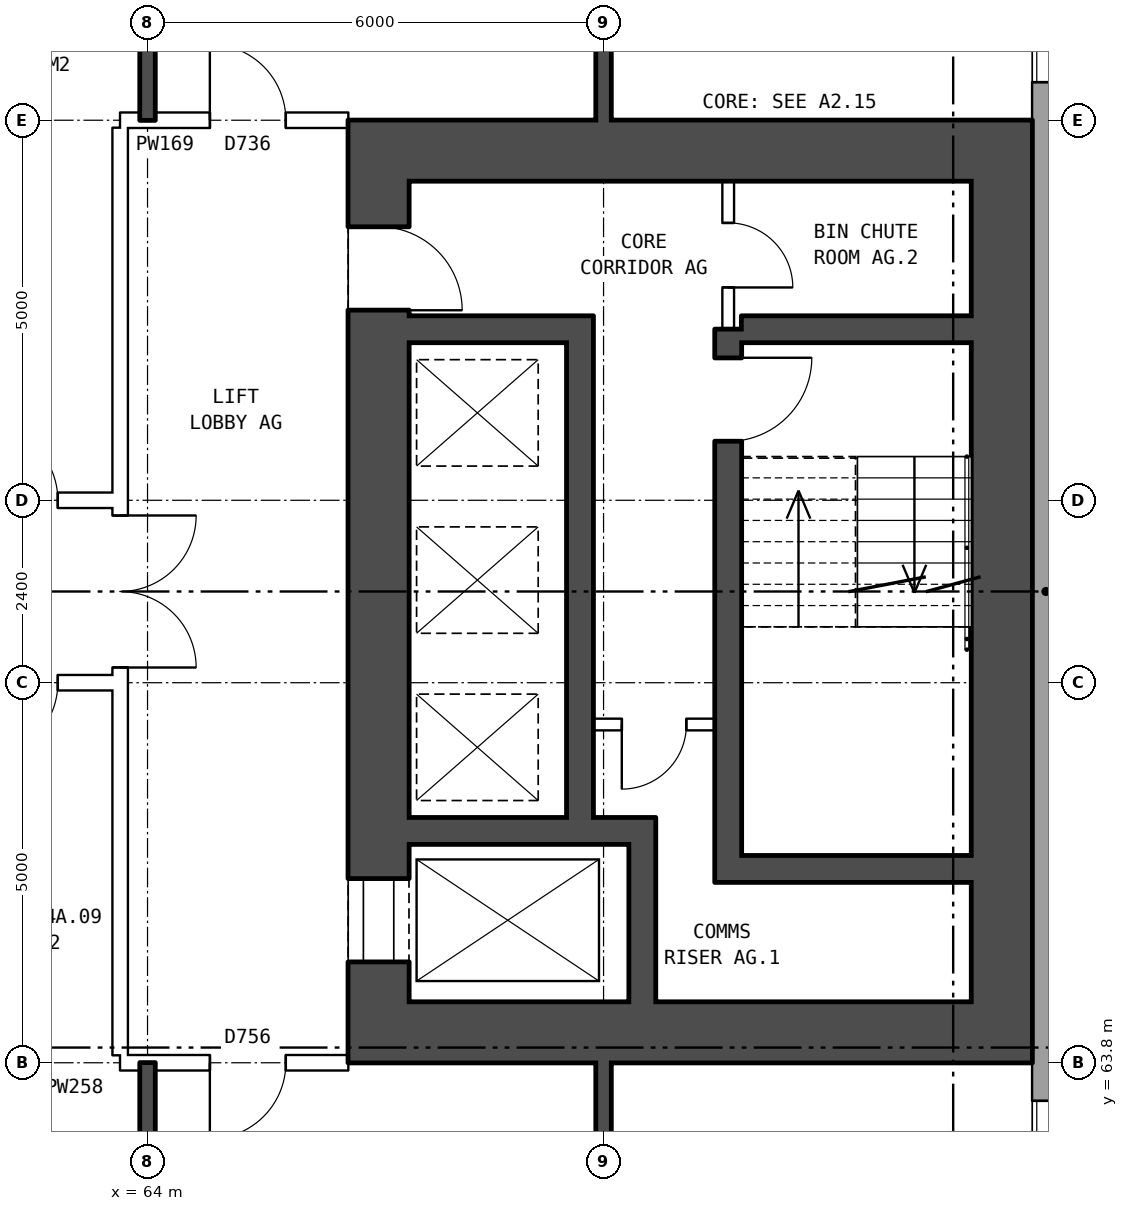
"""IFC4 building model, lengths in metres.
Left out: names, types, materials, properties, quantities, classifications, styles, units other than length and angle.
Written with IfcOpenShell. Run it as: python <this file> out.ifc"""

import sys

from ifc_helpers import new_model, si_unit, direction, frame, frame_2d, origin, place, context, subcontext, project, spatial, rectangle, extrude, element, fill, save


model = new_model("IFC4")
c1 = context("Model", 3, precision=1e-05, world=origin(), true_north=direction((0.0, 1.0)))
c2 = subcontext(c1, "Body", "Model", "MODEL_VIEW")
j1 = project(units=[si_unit("LENGTHUNIT", "METRE"), si_unit("PLANEANGLEUNIT", "RADIAN")], contexts=[c1])
p1 = place(None, origin())
s1 = spatial("IfcSite", under=j1, at=p1, CompositionType="ELEMENT")
p2 = place(p1, origin())
s2 = spatial("IfcBuilding", under=s1, at=p2, CompositionType="ELEMENT")
p3 = place(p2, frame((0.0, 0.0, 53.6)))
s3 = spatial("IfcBuildingStorey", under=s2, at=p3, CompositionType="ELEMENT", Elevation=53.6)
p4 = place(p3, frame((75.82, 57.075, 0.0), z_axis=(0.0, 0.0, 1.0), x_axis=(0.0, 1.0, 0.0)))
e1 = element("IfcWall", 1, at=p4, inside=s3, PredefinedType="STANDARD", context=c2, shape_type="SweptSolid", body=[
    extrude(rectangle(XDim=25.851, YDim=0.36, at=frame_2d((12.925, 0.0))), origin(), (0.0, 0.0, 1.0), 2.85),
])
p5 = place(p4, frame((1.625, 0.0, 0.8)))
e2 = element("IfcOpeningElement", 2, at=p5, cuts=e1, PredefinedType="OPENING", context=c2, shape_type="SweptSolid", body=[
    extrude(rectangle(XDim=1.6, YDim=1.8, at=frame_2d((0.8, 0.9))), frame((0.0, 0.19, 0.0), z_axis=(0.0, -1.0, 0.0), x_axis=(1.0, 0.0, 0.0)), (0.0, 0.0, 1.0), 0.38),
])
p6 = place(p4, frame((4.625, 0.0, 0.8)))
e3 = element("IfcOpeningElement", 3, at=p6, cuts=e1, PredefinedType="OPENING", context=c2, shape_type="SweptSolid", body=[
    extrude(rectangle(XDim=1.6, YDim=1.8, at=frame_2d((0.8, 0.9))), frame((0.0, 0.19, 0.0), z_axis=(0.0, -1.0, 0.0), x_axis=(1.0, 0.0, 0.0)), (0.0, 0.0, 1.0), 0.38),
])
p7 = place(p4, frame((19.625, 0.0, 0.8)))
e4 = element("IfcOpeningElement", 4, at=p7, cuts=e1, PredefinedType="OPENING", context=c2, shape_type="SweptSolid", body=[
    extrude(rectangle(XDim=1.6, YDim=1.8, at=frame_2d((0.8, 0.9))), frame((0.0, 0.19, 0.0), z_axis=(0.0, -1.0, 0.0), x_axis=(1.0, 0.0, 0.0)), (0.0, 0.0, 1.0), 0.38),
])
p8 = place(p4, frame((22.625, 0.0, 0.8)))
e5 = element("IfcOpeningElement", 5, at=p8, cuts=e1, PredefinedType="OPENING", context=c2, shape_type="SweptSolid", body=[
    extrude(rectangle(XDim=1.6, YDim=1.8, at=frame_2d((0.8, 0.9))), frame((0.0, 0.19, 0.0), z_axis=(0.0, -1.0, 0.0), x_axis=(1.0, 0.0, 0.0)), (0.0, 0.0, 1.0), 0.38),
])
p9 = place(p3, frame((67.04, 64.6, 0.0), z_axis=(0.0, 0.0, 1.0), x_axis=(0.0, 1.0, 0.0)))
e6 = element("IfcWall", 6, at=p9, inside=s3, PredefinedType="SHEAR", context=c2, shape_type="SweptSolid", body=[
    extrude(rectangle(XDim=10.8, YDim=0.8, at=frame_2d((5.4, 0.0))), origin(), (0.0, 0.0, 1.0), 2.85),
])
p10 = place(p9, frame((0.525, 0.0, 0.0)))
e7 = element("IfcOpeningElement", 7, at=p10, cuts=e6, PredefinedType="OPENING", context=c2, shape_type="SweptSolid", body=[
    extrude(rectangle(XDim=1.1, YDim=2.1, at=frame_2d((0.55, 1.05))), frame((0.0, 0.41, 0.0), z_axis=(0.0, -1.0, 0.0), x_axis=(1.0, 0.0, 0.0)), (0.0, 0.0, 1.0), 0.82),
])
p11 = place(p9, frame((9.1, 0.0, 0.0)))
e8 = element("IfcOpeningElement", 8, at=p11, cuts=e6, PredefinedType="OPENING", context=c2, shape_type="SweptSolid", body=[
    extrude(rectangle(XDim=1.1, YDim=2.1, at=frame_2d((0.55, 1.05))), frame((0.0, 0.41, 0.0), z_axis=(0.0, -1.0, 0.0), x_axis=(1.0, 0.0, 0.0)), (0.0, 0.0, 1.0), 0.82),
])
p12 = place(p3, frame((75.24, 64.6, 0.0), z_axis=(0.0, 0.0, 1.0), x_axis=(0.0, 1.0, 0.0)))
e9 = element("IfcWall", 9, at=p12, inside=s3, PredefinedType="SHEAR", context=c2, shape_type="SweptSolid", body=[
    extrude(rectangle(XDim=10.8, YDim=0.8, at=frame_2d((5.4, 0.0))), origin(), (0.0, 0.0, 1.0), 2.85),
])
for number, where, z_axis, x_axis in (
    (10, (66.64, 64.2, 0.0), (0.0, 0.0, 1.0), (1.0, 0.0, 0.0)),
    (11, (66.64, 75.8, 0.0), (0.0, 0.0, 1.0), (1.0, 0.0, 0.0)),
):
    element("IfcWall", number, at=place(p3, frame(where, z_axis=z_axis, x_axis=x_axis)), inside=s3, PredefinedType="SHEAR", context=c2, shape_type="SweptSolid", body=[
        extrude(rectangle(XDim=9.0, YDim=0.8, at=frame_2d((4.5, 0.0))), origin(), (0.0, 0.0, 1.0), 2.85),
    ])
p13 = place(p3, frame((71.815, 66.35, 0.0), z_axis=(0.0, 0.0, 1.0), x_axis=(1.0, 0.0, 0.0)))
e12 = element("IfcWall", 12, at=p13, inside=s3, PredefinedType="SHEAR", context=c2, shape_type="SweptSolid", body=[
    extrude(rectangle(XDim=3.025, YDim=0.35, at=frame_2d((1.513, 0.0))), origin(), (0.0, 0.0, 1.0), 2.85),
])
p14 = place(p3, frame((67.44, 66.85, 0.0), z_axis=(0.0, 0.0, 1.0), x_axis=(1.0, 0.0, 0.0)))
e13 = element("IfcWall", 13, at=p14, inside=s3, PredefinedType="SHEAR", context=c2, shape_type="SweptSolid", body=[
    extrude(rectangle(XDim=3.245, YDim=0.35, at=frame_2d((1.623, 0.0))), origin(), (0.0, 0.0, 1.0), 2.85),
])
p15 = place(p3, frame((69.865, 68.25, 0.0), z_axis=(0.0, 0.0, 1.0), x_axis=(1.0, 0.0, 0.0)))
e14 = element("IfcWall", 14, at=p15, inside=s3, PredefinedType="PARTITIONING", context=c2, shape_type="SweptSolid", body=[
    extrude(rectangle(XDim=1.6, YDim=0.15, at=frame_2d((0.8, 0.0))), origin(), (0.0, 0.0, 1.0), 2.85),
])
p16 = place(p15, frame((0.375, 0.0, 0.0)))
e15 = element("IfcOpeningElement", 15, at=p16, cuts=e14, PredefinedType="OPENING", context=c2, shape_type="SweptSolid", body=[
    extrude(rectangle(XDim=0.85, YDim=2.1, at=frame_2d((0.425, 1.05))), frame((0.0, 0.085, 0.0), z_axis=(0.0, -1.0, 0.0), x_axis=(1.0, 0.0, 0.0)), (0.0, 0.0, 1.0), 0.17),
])
p17 = place(p3, frame((67.44, 73.45, 0.0), z_axis=(0.0, 0.0, 1.0), x_axis=(1.0, 0.0, 0.0)))
e16 = element("IfcWall", 16, at=p17, inside=s3, PredefinedType="SHEAR", context=c2, shape_type="SweptSolid", body=[
    extrude(rectangle(XDim=2.075, YDim=0.35, at=frame_2d((1.038, 0.0))), origin(), (0.0, 0.0, 1.0), 2.85),
])
p18 = place(p3, frame((71.815, 73.45, 0.0), z_axis=(0.0, 0.0, 1.0), x_axis=(1.0, 0.0, 0.0)))
e17 = element("IfcWall", 17, at=p18, inside=s3, PredefinedType="SHEAR", context=c2, shape_type="SweptSolid", body=[
    extrude(rectangle(XDim=3.025, YDim=0.35, at=frame_2d((1.513, 0.0))), origin(), (0.0, 0.0, 1.0), 2.85),
])
p19 = place(p3, frame((69.69, 67.025, 0.0), z_axis=(0.0, 0.0, 1.0), x_axis=(0.0, 1.0, 0.0)))
e18 = element("IfcWall", 18, at=p19, inside=s3, PredefinedType="SHEAR", context=c2, shape_type="SweptSolid", body=[
    extrude(rectangle(XDim=6.6, YDim=0.35, at=frame_2d((3.3, 0.0))), origin(), (0.0, 0.0, 1.0), 2.85),
])
p20 = place(p3, frame((70.51, 64.6, 0.0), z_axis=(0.0, 0.0, 1.0), x_axis=(0.0, 1.0, 0.0)))
e19 = element("IfcWall", 19, at=p20, inside=s3, PredefinedType="SHEAR", context=c2, shape_type="SweptSolid", body=[
    extrude(rectangle(XDim=2.075, YDim=0.35, at=frame_2d((1.038, 0.0))), origin(), (0.0, 0.0, 1.0), 2.85),
])
p21 = place(p3, frame((71.64, 66.175, 0.0), z_axis=(0.0, 0.0, 1.0), x_axis=(0.0, 1.0, 0.0)))
e20 = element("IfcWall", 20, at=p21, inside=s3, PredefinedType="SHEAR", context=c2, shape_type="SweptSolid", body=[
    extrude(rectangle(XDim=7.275, YDim=0.35, at=frame_2d((3.637, 0.0))), origin(), (0.0, 0.0, 1.0), 2.85),
])
p22 = place(p21, frame((5.8, 0.0, 0.0)))
e21 = element("IfcOpeningElement", 21, at=p22, cuts=e20, PredefinedType="OPENING", context=c2, shape_type="SweptSolid", body=[
    extrude(rectangle(XDim=1.1, YDim=2.1, at=frame_2d((0.55, 1.05))), frame((0.0, 0.185, 0.0), z_axis=(0.0, -1.0, 0.0), x_axis=(1.0, 0.0, 0.0)), (0.0, 0.0, 1.0), 0.37),
])
p23 = place(p3, frame((71.64, 73.45, 0.0), z_axis=(0.0, 0.0, 1.0), x_axis=(0.0, 1.0, 0.0)))
e22 = element("IfcWall", 22, at=p23, inside=s3, PredefinedType="PARTITIONING", context=c2, shape_type="SweptSolid", body=[
    extrude(rectangle(XDim=1.95, YDim=0.15, at=frame_2d((0.975, 0.0))), origin(), (0.0, 0.0, 1.0), 2.85),
])
p24 = place(p23, frame((0.55, 0.0, 0.0)))
e23 = element("IfcOpeningElement", 23, at=p24, cuts=e22, PredefinedType="OPENING", context=c2, shape_type="SweptSolid", body=[
    extrude(rectangle(XDim=0.85, YDim=2.1, at=frame_2d((0.425, 1.05))), frame((0.0, 0.085, 0.0), z_axis=(0.0, -1.0, 0.0), x_axis=(1.0, 0.0, 0.0)), (0.0, 0.0, 1.0), 0.17),
])
p25 = place(p3, frame((63.64, 63.9, 0.0), z_axis=(0.0, 0.0, 1.0), x_axis=(0.0, 1.0, 0.0)))
e24 = element("IfcWall", 24, at=p25, inside=s3, PredefinedType="PARTITIONING", context=c2, shape_type="SweptSolid", body=[
    extrude(rectangle(XDim=12.2, YDim=0.2, at=frame_2d((6.1, 0.0))), origin(), (0.0, 0.0, 1.0), 2.85),
])
p26 = place(p25, frame((5.1, 0.0, 0.0)))
e25 = element("IfcOpeningElement", 25, at=p26, cuts=e24, PredefinedType="OPENING", context=c2, shape_type="SweptSolid", body=[
    extrude(rectangle(XDim=2.0, YDim=2.1, at=frame_2d((1.0, 1.05))), frame((0.0, 0.11, 0.0), z_axis=(0.0, -1.0, 0.0), x_axis=(1.0, 0.0, 0.0)), (0.0, 0.0, 1.0), 0.22),
])
p27 = place(p3, frame((63.64, 63.8, 0.0), z_axis=(0.0, 0.0, 1.0), x_axis=(1.0, 0.0, 0.0)))
e26 = element("IfcWall", 26, at=p27, inside=s3, PredefinedType="PARTITIONING", context=c2, shape_type="SweptSolid", body=[
    extrude(rectangle(XDim=3.0, YDim=0.2, at=frame_2d((1.5, 0.0))), origin(), (0.0, 0.0, 1.0), 2.85),
])
p28 = place(p27, frame((1.18, 0.0, 0.0)))
e27 = element("IfcOpeningElement", 27, at=p28, cuts=e26, PredefinedType="OPENING", context=c2, shape_type="SweptSolid", body=[
    extrude(rectangle(XDim=1.0, YDim=2.1, at=frame_2d((0.5, 1.05))), frame((0.0, 0.11, 0.0), z_axis=(0.0, -1.0, 0.0), x_axis=(1.0, 0.0, 0.0)), (0.0, 0.0, 1.0), 0.22),
])
p29 = place(p3, frame((44.36, 68.8, 0.0), z_axis=(0.0, 0.0, 1.0), x_axis=(1.0, 0.0, 0.0)))
e28 = element("IfcWall", 28, at=p29, inside=s3, PredefinedType="PARTITIONING", context=c2, shape_type="SweptSolid", body=[
    extrude(rectangle(XDim=19.28, YDim=0.2, at=frame_2d((9.64, 0.0))), origin(), (0.0, 0.0, 1.0), 2.85),
])
p30 = place(p29, frame((17.46, 0.0, 0.0)))
e29 = element("IfcOpeningElement", 29, at=p30, cuts=e28, PredefinedType="OPENING", context=c2, shape_type="SweptSolid", body=[
    extrude(rectangle(XDim=1.0, YDim=2.1, at=frame_2d((0.5, 1.05))), frame((0.0, 0.11, 0.0), z_axis=(0.0, -1.0, 0.0), x_axis=(1.0, 0.0, 0.0)), (0.0, 0.0, 1.0), 0.22),
])
p31 = place(p29, frame((11.64, 0.0, 0.0)))
e30 = element("IfcOpeningElement", 30, at=p31, cuts=e28, PredefinedType="OPENING", context=c2, shape_type="SweptSolid", body=[
    extrude(rectangle(XDim=1.0, YDim=2.1, at=frame_2d((0.5, 1.05))), frame((0.0, 0.11, 0.0), z_axis=(0.0, -1.0, 0.0), x_axis=(1.0, 0.0, 0.0)), (0.0, 0.0, 1.0), 0.22),
])
p32 = place(p29, frame((2.64, 0.0, 0.0)))
e31 = element("IfcOpeningElement", 31, at=p32, cuts=e28, PredefinedType="OPENING", context=c2, shape_type="SweptSolid", body=[
    extrude(rectangle(XDim=1.0, YDim=2.1, at=frame_2d((0.5, 1.05))), frame((0.0, 0.11, 0.0), z_axis=(0.0, -1.0, 0.0), x_axis=(1.0, 0.0, 0.0)), (0.0, 0.0, 1.0), 0.22),
])
p33 = place(p3, frame((44.36, 71.2, 0.0), z_axis=(0.0, 0.0, 1.0), x_axis=(1.0, 0.0, 0.0)))
e32 = element("IfcWall", 32, at=p33, inside=s3, PredefinedType="PARTITIONING", context=c2, shape_type="SweptSolid", body=[
    extrude(rectangle(XDim=19.28, YDim=0.2, at=frame_2d((9.64, 0.0))), origin(), (0.0, 0.0, 1.0), 2.85),
])
p34 = place(p33, frame((17.46, 0.0, 0.0)))
e33 = element("IfcOpeningElement", 33, at=p34, cuts=e32, PredefinedType="OPENING", context=c2, shape_type="SweptSolid", body=[
    extrude(rectangle(XDim=1.0, YDim=2.1, at=frame_2d((0.5, 1.05))), frame((0.0, 0.11, 0.0), z_axis=(0.0, -1.0, 0.0), x_axis=(1.0, 0.0, 0.0)), (0.0, 0.0, 1.0), 0.22),
])
p35 = place(p33, frame((8.64, 0.0, 0.0)))
e34 = element("IfcOpeningElement", 34, at=p35, cuts=e32, PredefinedType="OPENING", context=c2, shape_type="SweptSolid", body=[
    extrude(rectangle(XDim=1.0, YDim=2.1, at=frame_2d((0.5, 1.05))), frame((0.0, 0.11, 0.0), z_axis=(0.0, -1.0, 0.0), x_axis=(1.0, 0.0, 0.0)), (0.0, 0.0, 1.0), 0.22),
])
p36 = place(p33, frame((5.64, 0.0, 0.0)))
e35 = element("IfcOpeningElement", 35, at=p36, cuts=e32, PredefinedType="OPENING", context=c2, shape_type="SweptSolid", body=[
    extrude(rectangle(XDim=1.0, YDim=2.1, at=frame_2d((0.5, 1.05))), frame((0.0, 0.11, 0.0), z_axis=(0.0, -1.0, 0.0), x_axis=(1.0, 0.0, 0.0)), (0.0, 0.0, 1.0), 0.22),
])
p37 = place(p3, frame((63.64, 76.2, 0.0), z_axis=(0.0, 0.0, 1.0), x_axis=(1.0, 0.0, 0.0)))
e36 = element("IfcWall", 36, at=p37, inside=s3, PredefinedType="PARTITIONING", context=c2, shape_type="SweptSolid", body=[
    extrude(rectangle(XDim=3.0, YDim=0.2, at=frame_2d((1.5, 0.0))), origin(), (0.0, 0.0, 1.0), 2.85),
])
p38 = place(p37, frame((1.18, 0.0, 0.0)))
e37 = element("IfcOpeningElement", 37, at=p38, cuts=e36, PredefinedType="OPENING", context=c2, shape_type="SweptSolid", body=[
    extrude(rectangle(XDim=1.0, YDim=2.1, at=frame_2d((0.5, 1.05))), frame((0.0, 0.11, 0.0), z_axis=(0.0, -1.0, 0.0), x_axis=(1.0, 0.0, 0.0)), (0.0, 0.0, 1.0), 0.22),
])
for number, where, z_axis, x_axis in (
    (38, (64.0, 54.36, 0.0), (0.0, 0.0, 1.0), (0.0, 1.0, 0.0)),
    (39, (64.0, 76.2, 0.0), (0.0, 0.0, 1.0), (0.0, 1.0, 0.0)),
):
    element("IfcWall", number, at=place(p3, frame(where, z_axis=z_axis, x_axis=x_axis)), inside=s3, PredefinedType="SOLIDWALL", context=c2, shape_type="SweptSolid", body=[
        extrude(rectangle(XDim=9.44, YDim=0.2, at=frame_2d((4.72, 0.0))), origin(), (0.0, 0.0, 1.0), 2.85),
    ])
p39 = place(p3, frame((70.0, 54.36, 0.0), z_axis=(0.0, 0.0, 1.0), x_axis=(0.0, 1.0, 0.0)))
e40 = element("IfcWall", 40, at=p39, inside=s3, PredefinedType="SOLIDWALL", context=c2, shape_type="SweptSolid", body=[
    extrude(rectangle(XDim=9.44, YDim=0.2, at=frame_2d((4.72, 0.0))), origin(), (0.0, 0.0, 1.0), 2.85),
])
p40 = place(p39, frame((7.04, 0.0, 0.0)))
e41 = element("IfcOpeningElement", 41, at=p40, cuts=e40, PredefinedType="OPENING", context=c2, shape_type="SweptSolid", body=[
    extrude(rectangle(XDim=0.9, YDim=2.1, at=frame_2d((0.45, 1.05))), frame((0.0, 0.11, 0.0), z_axis=(0.0, -1.0, 0.0), x_axis=(1.0, 0.0, 0.0)), (0.0, 0.0, 1.0), 0.22),
])
p41 = place(p3, frame((70.0, 76.2, 0.0), z_axis=(0.0, 0.0, 1.0), x_axis=(0.0, 1.0, 0.0)))
e42 = element("IfcWall", 42, at=p41, inside=s3, PredefinedType="SOLIDWALL", context=c2, shape_type="SweptSolid", body=[
    extrude(rectangle(XDim=9.44, YDim=0.2, at=frame_2d((4.72, 0.0))), origin(), (0.0, 0.0, 1.0), 2.85),
])
p42 = place(p41, frame((7.17, 0.0, 0.0)))
e43 = element("IfcOpeningElement", 43, at=p42, cuts=e42, PredefinedType="OPENING", context=c2, shape_type="SweptSolid", body=[
    extrude(rectangle(XDim=0.9, YDim=2.1, at=frame_2d((0.45, 1.05))), frame((0.0, 0.11, 0.0), z_axis=(0.0, -1.0, 0.0), x_axis=(1.0, 0.0, 0.0)), (0.0, 0.0, 1.0), 0.22),
])
p43 = place(p41, frame((1.2, 0.0, 0.0)))
e44 = element("IfcOpeningElement", 44, at=p43, cuts=e42, PredefinedType="OPENING", context=c2, shape_type="SweptSolid", body=[
    extrude(rectangle(XDim=0.9, YDim=2.1, at=frame_2d((0.45, 1.05))), frame((0.0, 0.11, 0.0), z_axis=(0.0, -1.0, 0.0), x_axis=(1.0, 0.0, 0.0)), (0.0, 0.0, 1.0), 0.22),
])
p44 = place(p6, origin())
e45 = element("IfcWindow", 45, at=p44, inside=s3, PartitioningType="SINGLE_PANEL", PredefinedType="WINDOW", context=c2, shape_type="SweptSolid", body=[
    extrude(rectangle(XDim=1.6, YDim=1.8, at=frame_2d((0.8, 0.9))), frame((0.0, 0.15, 0.0), z_axis=(0.0, -1.0, 0.0), x_axis=(1.0, 0.0, 0.0)), (0.0, 0.0, 1.0), 0.06),
])
fill(e3, e45)
p45 = place(p7, origin())
e46 = element("IfcWindow", 46, at=p45, inside=s3, PartitioningType="SINGLE_PANEL", PredefinedType="WINDOW", context=c2, shape_type="SweptSolid", body=[
    extrude(rectangle(XDim=1.6, YDim=1.8, at=frame_2d((0.8, 0.9))), frame((0.0, 0.15, 0.0), z_axis=(0.0, -1.0, 0.0), x_axis=(1.0, 0.0, 0.0)), (0.0, 0.0, 1.0), 0.06),
])
fill(e4, e46)
p46 = place(p10, origin())
e47 = element("IfcDoor", 47, at=p46, inside=s3, OperationType="DOUBLE_DOOR_SLIDING", PredefinedType="DOOR", context=c2, shape_type="SweptSolid", body=[
    extrude(rectangle(XDim=1.1, YDim=2.1, at=frame_2d((0.55, 1.05))), frame((0.0, -0.335, 0.0), z_axis=(0.0, -1.0, 0.0), x_axis=(1.0, 0.0, 0.0)), (0.0, 0.0, 1.0), 0.05),
])
fill(e7, e47)
p47 = place(p11, frame((1.1, 0.0, 0.0), z_axis=(0.0, 0.0, 1.0), x_axis=(-1.0, 0.0, 0.0)))
e48 = element("IfcDoor", 48, at=p47, inside=s3, OperationType="SINGLE_SWING_RIGHT", PredefinedType="DOOR", context=c2, shape_type="SweptSolid", body=[
    extrude(rectangle(XDim=1.1, YDim=2.1, at=frame_2d((0.55, 1.05))), frame((0.0, 0.385, 0.0), z_axis=(0.0, -1.0, 0.0), x_axis=(1.0, 0.0, 0.0)), (0.0, 0.0, 1.0), 0.05),
])
fill(e8, e48)
p48 = place(p22, frame((1.1, 0.0, 0.0), z_axis=(0.0, 0.0, 1.0), x_axis=(-1.0, 0.0, 0.0)))
e49 = element("IfcDoor", 49, at=p48, inside=s3, OperationType="SINGLE_SWING_LEFT", PredefinedType="DOOR", context=c2, shape_type="SweptSolid", body=[
    extrude(rectangle(XDim=1.1, YDim=2.1, at=frame_2d((0.55, 1.05))), frame((0.0, 0.025, 0.0), z_axis=(0.0, -1.0, 0.0), x_axis=(1.0, 0.0, 0.0)), (0.0, 0.0, 1.0), 0.05),
])
fill(e21, e49)
p49 = place(p16, frame((0.85, 0.0, 0.0), z_axis=(0.0, 0.0, 1.0), x_axis=(-1.0, 0.0, 0.0)))
e50 = element("IfcDoor", 50, at=p49, inside=s3, OperationType="SINGLE_SWING_RIGHT", PredefinedType="DOOR", context=c2, shape_type="SweptSolid", body=[
    extrude(rectangle(XDim=0.85, YDim=2.1, at=frame_2d((0.425, 1.05))), frame((0.0, 0.025, 0.0), z_axis=(0.0, -1.0, 0.0), x_axis=(1.0, 0.0, 0.0)), (0.0, 0.0, 1.0), 0.05),
])
fill(e15, e50)
p50 = place(p24, frame((0.85, 0.0, 0.0), z_axis=(0.0, 0.0, 1.0), x_axis=(-1.0, 0.0, 0.0)))
e51 = element("IfcDoor", 51, at=p50, inside=s3, OperationType="SINGLE_SWING_RIGHT", PredefinedType="DOOR", context=c2, shape_type="SweptSolid", body=[
    extrude(rectangle(XDim=0.85, YDim=2.1, at=frame_2d((0.425, 1.05))), frame((0.0, 0.025, 0.0), z_axis=(0.0, -1.0, 0.0), x_axis=(1.0, 0.0, 0.0)), (0.0, 0.0, 1.0), 0.05),
])
fill(e23, e51)
p51 = place(p26, frame((2.0, 0.0, 0.0), z_axis=(0.0, 0.0, 1.0), x_axis=(-1.0, 0.0, 0.0)))
e52 = element("IfcDoor", 52, at=p51, inside=s3, OperationType="DOUBLE_DOOR_SINGLE_SWING", PredefinedType="DOOR", context=c2, shape_type="SweptSolid", body=[
    extrude(rectangle(XDim=2.0, YDim=2.1, at=frame_2d((1.0, 1.05))), frame((0.0, 0.025, 0.0), z_axis=(0.0, -1.0, 0.0), x_axis=(1.0, 0.0, 0.0)), (0.0, 0.0, 1.0), 0.05),
])
fill(e25, e52)
p52 = place(p28, frame((1.0, 0.0, 0.0), z_axis=(0.0, 0.0, 1.0), x_axis=(-1.0, 0.0, 0.0)))
e53 = element("IfcDoor", 53, at=p52, inside=s3, OperationType="SINGLE_SWING_RIGHT", PredefinedType="DOOR", context=c2, shape_type="SweptSolid", body=[
    extrude(rectangle(XDim=1.0, YDim=2.1, at=frame_2d((0.5, 1.05))), frame((0.0, 0.025, 0.0), z_axis=(0.0, -1.0, 0.0), x_axis=(1.0, 0.0, 0.0)), (0.0, 0.0, 1.0), 0.05),
])
fill(e27, e53)
p53 = place(p38, origin())
e54 = element("IfcDoor", 54, at=p53, inside=s3, OperationType="SINGLE_SWING_LEFT", PredefinedType="DOOR", context=c2, shape_type="SweptSolid", body=[
    extrude(rectangle(XDim=1.0, YDim=2.1, at=frame_2d((0.5, 1.05))), frame((0.0, 0.025, 0.0), z_axis=(0.0, -1.0, 0.0), x_axis=(1.0, 0.0, 0.0)), (0.0, 0.0, 1.0), 0.05),
])
fill(e37, e54)
p54 = place(p30, frame((1.0, 0.0, 0.0), z_axis=(0.0, 0.0, 1.0), x_axis=(-1.0, 0.0, 0.0)))
e55 = element("IfcDoor", 55, at=p54, inside=s3, OperationType="SINGLE_SWING_RIGHT", PredefinedType="DOOR", context=c2, shape_type="SweptSolid", body=[
    extrude(rectangle(XDim=1.0, YDim=2.1, at=frame_2d((0.5, 1.05))), frame((0.0, 0.025, 0.0), z_axis=(0.0, -1.0, 0.0), x_axis=(1.0, 0.0, 0.0)), (0.0, 0.0, 1.0), 0.05),
])
fill(e29, e55)
p55 = place(p34, origin())
e56 = element("IfcDoor", 56, at=p55, inside=s3, OperationType="SINGLE_SWING_LEFT", PredefinedType="DOOR", context=c2, shape_type="SweptSolid", body=[
    extrude(rectangle(XDim=1.0, YDim=2.1, at=frame_2d((0.5, 1.05))), frame((0.0, 0.025, 0.0), z_axis=(0.0, -1.0, 0.0), x_axis=(1.0, 0.0, 0.0)), (0.0, 0.0, 1.0), 0.05),
])
fill(e33, e56)
save(model, sys.argv[1])
